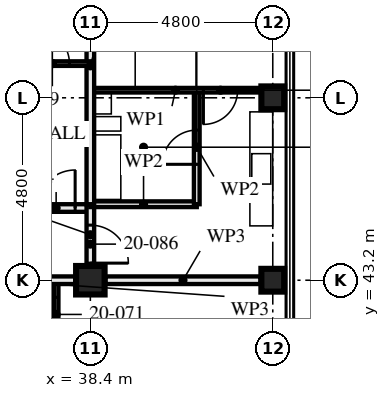
"""IFC4 building model, lengths in metres.
Left out: names, types, materials, properties, quantities, classifications, styles, units other than length and angle.
Written with IfcOpenShell. Run it as: python <this file> out.ifc"""

import sys

from ifc_helpers import new_model, si_unit, direction, frame, frame_2d, origin, origin_2d, place, context, subcontext, project, spatial, rectangle, hollow_rectangle, extrude, element, fill, save


model = new_model("IFC4")
c1 = context("Model", 3, precision=1e-05, world=origin(), true_north=direction((0.0, 1.0)))
c2 = subcontext(c1, "Body", "Model", "MODEL_VIEW")
j1 = project(units=[si_unit("LENGTHUNIT", "METRE"), si_unit("PLANEANGLEUNIT", "RADIAN")], contexts=[c1])
p1 = place(None, origin())
s1 = spatial("IfcSite", under=j1, at=p1, CompositionType="ELEMENT")
p2 = place(p1, origin())
s2 = spatial("IfcBuilding", under=s1, at=p2, CompositionType="ELEMENT")
p3 = place(p2, frame((0.0, 0.0, 76.0)))
s3 = spatial("IfcBuildingStorey", under=s2, at=p3, CompositionType="ELEMENT", Elevation=76.0)
p4 = place(p3, frame((38.4, 43.2, 0.0), z_axis=(0.0, 0.0, 1.0), x_axis=(0.0, 1.0, 0.0)))
e1 = element("IfcColumn", 1, at=p4, inside=s3, PredefinedType="COLUMN", context=c2, shape_type="SweptSolid", body=[
    extrude(hollow_rectangle(XDim=0.75, YDim=0.75, WallThickness=0.08, at=origin_2d()), origin(), (0.0, 0.0, 1.0), 3.5),
])
for number, where, z_axis, x_axis in (
    (2, (43.2, 43.2, 0.0), (0.0, 0.0, 1.0), (0.0, 1.0, 0.0)),
    (3, (43.2, 48.0, 0.0), (0.0, 0.0, 1.0), (1.0, 0.0, 0.0)),
):
    element("IfcColumn", number, at=place(p3, frame(where, z_axis=z_axis, x_axis=x_axis)), inside=s3, PredefinedType="COLUMN", context=c2, shape_type="SweptSolid", body=[
        extrude(hollow_rectangle(XDim=0.6, YDim=0.6, WallThickness=0.08, at=origin_2d()), origin(), (0.0, 0.0, 1.0), 3.5),
    ])
p5 = place(p3, frame((37.5, 38.4, 0.0), z_axis=(0.0, 0.0, 1.0), x_axis=(0.0, 1.0, 0.0)))
e4 = element("IfcWall", 4, at=p5, inside=s3, PredefinedType="PARTITIONING", context=c2, shape_type="SweptSolid", body=[
    extrude(rectangle(XDim=4.8, YDim=0.12, at=frame_2d((2.4, 0.0))), origin(), (0.0, 0.0, 1.0), 3.25),
])
p6 = place(p5, frame((3.45, 0.0, 0.0)))
e5 = element("IfcOpeningElement", 5, at=p6, cuts=e4, PredefinedType="OPENING", context=c2, shape_type="SweptSolid", body=[
    extrude(rectangle(XDim=0.9, YDim=2.1, at=frame_2d((0.45, 1.05))), frame((0.0, 0.071, 0.0), z_axis=(0.0, -1.0, 0.0), x_axis=(1.0, 0.0, 0.0)), (0.0, 0.0, 1.0), 0.141),
])
p7 = place(p3, frame((41.2, 48.2, 0.0), z_axis=(0.0, 0.0, 1.0), x_axis=(0.0, -1.0, 0.0)))
e6 = element("IfcWall", 6, at=p7, inside=s3, PredefinedType="PARTITIONING", context=c2, shape_type="SweptSolid", body=[
    extrude(rectangle(XDim=3.0, YDim=0.15, at=frame_2d((1.5, 0.0))), origin(), (0.0, 0.0, 1.0), 2.04),
])
p8 = place(p7, frame((1.05, 0.0, 0.0)))
e7 = element("IfcOpeningElement", 7, at=p8, cuts=e6, PredefinedType="OPENING", context=c2, shape_type="SweptSolid", body=[
    extrude(rectangle(XDim=0.9, YDim=2.0, at=frame_2d((0.45, 1.0))), frame((0.0, 0.085, 0.0), z_axis=(0.0, -1.0, 0.0), x_axis=(1.0, 0.0, 0.0)), (0.0, 0.0, 1.0), 0.171),
])
p9 = place(p3, frame((41.2, 45.2, 0.0), z_axis=(0.0, 0.0, 1.0), x_axis=(-1.0, 0.0, 0.0)))
e8 = element("IfcWall", 8, at=p9, inside=s3, PredefinedType="PARTITIONING", context=c2, shape_type="SweptSolid", body=[
    extrude(rectangle(XDim=2.8, YDim=0.15, at=frame_2d((1.4, 0.0))), origin(), (0.0, 0.0, 1.0), 3.25),
])
p10 = place(p3, frame((42.88, 48.2, 0.0), z_axis=(0.0, 0.0, 1.0), x_axis=(-1.0, 0.0, 0.0)))
e9 = element("IfcWall", 9, at=p10, inside=s3, PredefinedType="PARTITIONING", context=c2, shape_type="SweptSolid", body=[
    extrude(rectangle(XDim=4.48, YDim=0.12, at=frame_2d((2.24, 0.0))), origin(), (0.0, 0.0, 1.0), 2.04),
])
p11 = place(p10, frame((0.605, 0.0, 0.0)))
e10 = element("IfcOpeningElement", 10, at=p11, cuts=e9, PredefinedType="OPENING", context=c2, shape_type="SweptSolid", body=[
    extrude(rectangle(XDim=0.9, YDim=2.0, at=frame_2d((0.45, 1.0))), frame((0.0, 0.071, 0.0), z_axis=(0.0, -1.0, 0.0), x_axis=(1.0, 0.0, 0.0)), (0.0, 0.0, 1.0), 0.141),
])
p12 = place(p3, frame((38.4, 52.48, 0.0), z_axis=(0.0, 0.0, 1.0), x_axis=(0.0, -1.0, 0.0)))
e11 = element("IfcWall", 11, at=p12, inside=s3, PredefinedType="PARTITIONING", context=c2, shape_type="SweptSolid", body=[
    extrude(rectangle(XDim=7.28, YDim=0.2, at=frame_2d((3.64, 0.0))), origin(), (0.0, 0.0, 1.0), 2.04),
])
p13 = place(p3, frame((38.4, 48.9, 0.0), z_axis=(0.0, 0.0, 1.0), x_axis=(-1.0, 0.0, 0.0)))
e12 = element("IfcWall", 12, at=p13, inside=s3, PredefinedType="PARTITIONING", context=c2, shape_type="SweptSolid", body=[
    extrude(rectangle(XDim=2.0, YDim=0.12, at=frame_2d((1.0, 0.0))), origin(), (0.0, 0.0, 1.0), 3.25),
])
p14 = place(p13, frame((0.55, 0.0, 0.0)))
e13 = element("IfcOpeningElement", 13, at=p14, cuts=e12, PredefinedType="OPENING", context=c2, shape_type="SweptSolid", body=[
    extrude(rectangle(XDim=0.9, YDim=2.1, at=frame_2d((0.45, 1.05))), frame((0.0, 0.071, 0.0), z_axis=(0.0, -1.0, 0.0), x_axis=(1.0, 0.0, 0.0)), (0.0, 0.0, 1.0), 0.141),
])
p15 = place(p3, frame((38.4, 45.1, 0.0), z_axis=(0.0, 0.0, 1.0), x_axis=(-1.0, 0.0, 0.0)))
e14 = element("IfcWall", 14, at=p15, inside=s3, PredefinedType="PARTITIONING", context=c2, shape_type="SweptSolid", body=[
    extrude(rectangle(XDim=9.6, YDim=0.2, at=frame_2d((4.8, 0.0))), origin(), (0.0, 0.0, 1.0), 3.25),
])
p16 = place(p15, frame((0.4, 0.0, 0.0)))
e15 = element("IfcOpeningElement", 15, at=p16, cuts=e14, PredefinedType="OPENING", context=c2, shape_type="SweptSolid", body=[
    extrude(rectangle(XDim=1.0, YDim=2.1, at=frame_2d((0.5, 1.05))), frame((0.0, 0.111, 0.0), z_axis=(0.0, -1.0, 0.0), x_axis=(1.0, 0.0, 0.0)), (0.0, 0.0, 1.0), 0.221),
])
p17 = place(p15, frame((5.2, 0.0, 0.0)))
e16 = element("IfcOpeningElement", 16, at=p17, cuts=e14, PredefinedType="OPENING", context=c2, shape_type="SweptSolid", body=[
    extrude(rectangle(XDim=1.0, YDim=2.1, at=frame_2d((0.5, 1.05))), frame((0.0, 0.111, 0.0), z_axis=(0.0, -1.0, 0.0), x_axis=(1.0, 0.0, 0.0)), (0.0, 0.0, 1.0), 0.221),
])
p18 = place(p3, frame((38.4, 45.2, 0.0), z_axis=(0.0, 0.0, 1.0), x_axis=(0.0, -1.0, 0.0)))
e17 = element("IfcWall", 17, at=p18, inside=s3, PredefinedType="PARTITIONING", context=c2, shape_type="SweptSolid", body=[
    extrude(rectangle(XDim=1.605, YDim=0.2, at=frame_2d((0.802, 0.0))), origin(), (0.0, 0.0, 1.0), 3.25),
])
p19 = place(p18, frame((0.55, 0.0, 0.0)))
e18 = element("IfcOpeningElement", 18, at=p19, cuts=e17, PredefinedType="OPENING", context=c2, shape_type="SweptSolid", body=[
    extrude(rectangle(XDim=1.0, YDim=2.1, at=frame_2d((0.5, 1.05))), frame((0.0, 0.111, 0.0), z_axis=(0.0, -1.0, 0.0), x_axis=(1.0, 0.0, 0.0)), (0.0, 0.0, 1.0), 0.221),
])
p20 = place(p3, frame((42.88, 43.2, 0.0), z_axis=(0.0, 0.0, 1.0), x_axis=(-1.0, 0.0, 0.0)))
e19 = element("IfcWall", 19, at=p20, inside=s3, PredefinedType="PARTITIONING", context=c2, shape_type="SweptSolid", body=[
    extrude(rectangle(XDim=4.085, YDim=0.2, at=frame_2d((2.042, 0.0))), origin(), (0.0, 0.0, 1.0), 2.04),
])
p21 = place(p3, frame((38.005, 43.2, 0.0), z_axis=(0.0, 0.0, 1.0), x_axis=(-1.0, 0.0, 0.0)))
e20 = element("IfcWall", 20, at=p21, inside=s3, PredefinedType="PARTITIONING", context=c2, shape_type="SweptSolid", body=[
    extrude(rectangle(XDim=4.01, YDim=0.2, at=frame_2d((2.005, 0.0))), origin(), (0.0, 0.0, 1.0), 2.04),
])
p22 = place(p6, origin())
e21 = element("IfcDoor", 21, at=p22, inside=s3, OperationType="SINGLE_SWING_LEFT", PredefinedType="DOOR", context=c2, shape_type="SweptSolid", body=[
    extrude(rectangle(XDim=0.9, YDim=2.1, at=frame_2d((0.45, 1.05))), frame((0.0, 0.022, 0.0), z_axis=(0.0, -1.0, 0.0), x_axis=(1.0, 0.0, 0.0)), (0.0, 0.0, 1.0), 0.044),
])
fill(e5, e21)
p23 = place(p8, frame((0.9, 0.0, 0.0), z_axis=(0.0, 0.0, 1.0), x_axis=(-1.0, 0.0, 0.0)))
e22 = element("IfcDoor", 22, at=p23, inside=s3, OperationType="SINGLE_SWING_RIGHT", PredefinedType="DOOR", context=c2, shape_type="SweptSolid", body=[
    extrude(rectangle(XDim=0.9, YDim=2.0, at=frame_2d((0.45, 1.0))), frame((0.0, 0.022, 0.0), z_axis=(0.0, -1.0, 0.0), x_axis=(1.0, 0.0, 0.0)), (0.0, 0.0, 1.0), 0.044),
])
fill(e7, e22)
p24 = place(p11, origin())
e23 = element("IfcDoor", 23, at=p24, inside=s3, OperationType="SINGLE_SWING_LEFT", PredefinedType="DOOR", context=c2, shape_type="SweptSolid", body=[
    extrude(rectangle(XDim=0.9, YDim=2.0, at=frame_2d((0.45, 1.0))), frame((0.0, 0.022, 0.0), z_axis=(0.0, -1.0, 0.0), x_axis=(1.0, 0.0, 0.0)), (0.0, 0.0, 1.0), 0.044),
])
fill(e10, e23)
p25 = place(p14, frame((0.9, 0.0, 0.0), z_axis=(0.0, 0.0, 1.0), x_axis=(-1.0, 0.0, 0.0)))
e24 = element("IfcDoor", 24, at=p25, inside=s3, OperationType="SINGLE_SWING_RIGHT", PredefinedType="DOOR", context=c2, shape_type="SweptSolid", body=[
    extrude(rectangle(XDim=0.9, YDim=2.1, at=frame_2d((0.45, 1.05))), frame((0.0, 0.022, 0.0), z_axis=(0.0, -1.0, 0.0), x_axis=(1.0, 0.0, 0.0)), (0.0, 0.0, 1.0), 0.044),
])
fill(e13, e24)
p26 = place(p16, frame((1.0, 0.0, 0.0), z_axis=(0.0, 0.0, 1.0), x_axis=(-1.0, 0.0, 0.0)))
e25 = element("IfcDoor", 25, at=p26, inside=s3, OperationType="SINGLE_SWING_LEFT", PredefinedType="DOOR", context=c2, shape_type="SweptSolid", body=[
    extrude(rectangle(XDim=1.0, YDim=2.1, at=frame_2d((0.5, 1.05))), frame((0.0, 0.027, 0.0), z_axis=(0.0, -1.0, 0.0), x_axis=(1.0, 0.0, 0.0)), (0.0, 0.0, 1.0), 0.054),
])
fill(e15, e25)
p27 = place(p19, origin())
e26 = element("IfcDoor", 26, at=p27, inside=s3, OperationType="SINGLE_SWING_LEFT", PredefinedType="DOOR", context=c2, shape_type="SweptSolid", body=[
    extrude(rectangle(XDim=1.0, YDim=2.1, at=frame_2d((0.5, 1.05))), frame((0.0, 0.027, 0.0), z_axis=(0.0, -1.0, 0.0), x_axis=(1.0, 0.0, 0.0)), (0.0, 0.0, 1.0), 0.054),
])
fill(e18, e26)
save(model, sys.argv[1])
